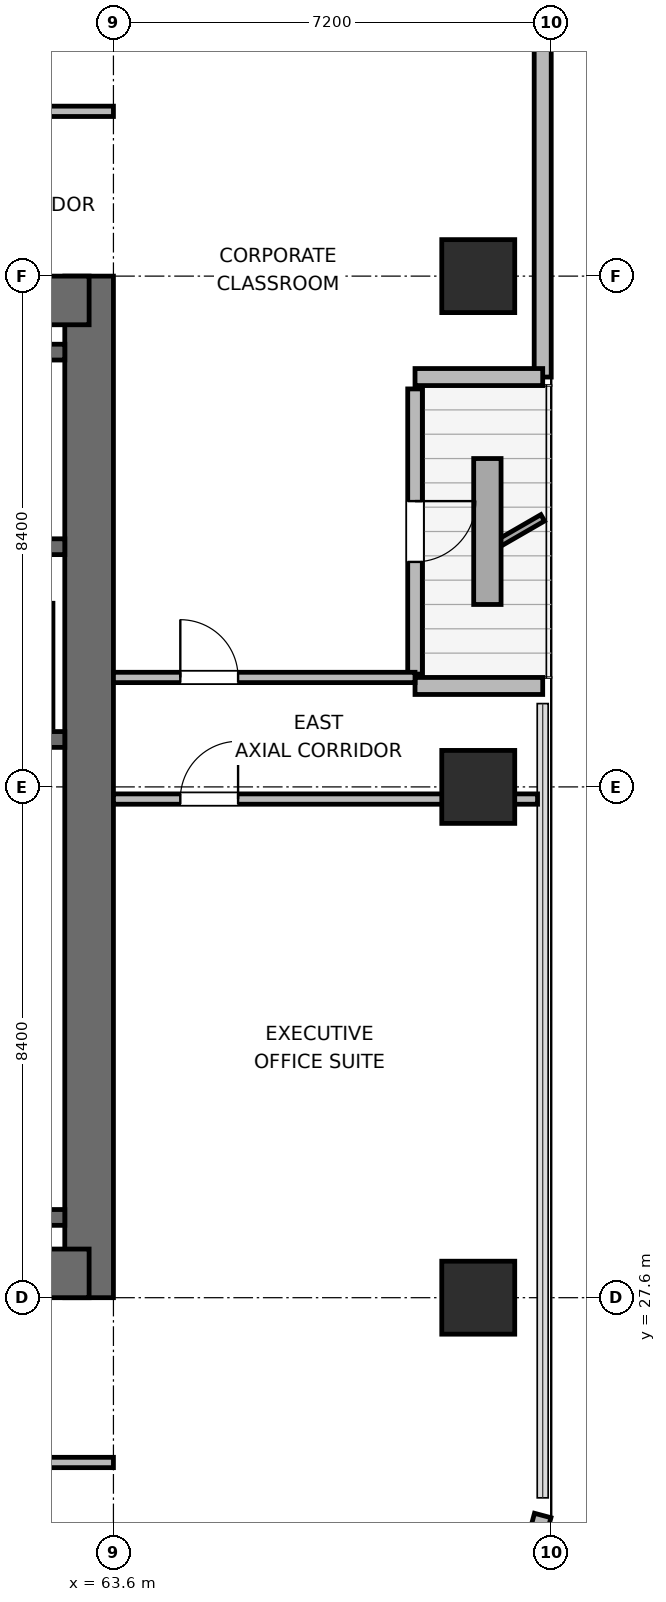
"""IFC4 building model, lengths in metres.
Left out: names, types, materials, properties, quantities, classifications, styles, units other than length and angle.
Written with IfcOpenShell. Run it as: python <this file> out.ifc"""

import sys

from ifc_helpers import new_model, si_unit, direction, frame, frame_2d, origin, origin_2d, place, context, subcontext, project, spatial, rectangle, extrude, element, fill, save


model = new_model("IFC4")
c1 = context("Model", 3, precision=1e-05, world=origin(), true_north=direction((0.0, 1.0)))
c2 = subcontext(c1, "Body", "Model", "MODEL_VIEW")
j1 = project(units=[si_unit("LENGTHUNIT", "METRE"), si_unit("PLANEANGLEUNIT", "RADIAN")], contexts=[c1])
p1 = place(None, origin())
s1 = spatial("IfcSite", under=j1, at=p1, CompositionType="ELEMENT")
p2 = place(p1, origin())
s2 = spatial("IfcBuilding", under=s1, at=p2, CompositionType="ELEMENT")
p3 = place(p2, frame((0.0, 0.0, 170.1)))
s3 = spatial("IfcBuildingStorey", under=s2, at=p3, CompositionType="ELEMENT", Elevation=170.1)
p4 = place(p3, frame((63.2, 27.6, 0.0), z_axis=(0.0, 0.0, 1.0), x_axis=(0.0, 1.0, 0.0)))
e1 = element("IfcWall", 1, at=p4, inside=s3, PredefinedType="SHEAR", context=c2, shape_type="SweptSolid", body=[
    extrude(rectangle(XDim=16.8, YDim=0.8, at=frame_2d((8.4, 0.0))), origin(), (0.0, 0.0, 1.0), 3.9),
])
p5 = place(p3, frame((54.0, 28.0, 0.0), z_axis=(0.0, 0.0, 1.0), x_axis=(1.0, 0.0, 0.0)))
e2 = element("IfcWall", 2, at=p5, inside=s3, PredefinedType="SHEAR", context=c2, shape_type="SweptSolid", body=[
    extrude(rectangle(XDim=9.2, YDim=0.8, at=frame_2d((4.6, 0.0))), origin(), (0.0, 0.0, 1.0), 3.9),
])
p6 = place(p5, frame((3.975, 0.0, 0.0)))
e3 = element("IfcOpeningElement", 3, at=p6, cuts=e2, PredefinedType="OPENING", context=c2, shape_type="SweptSolid", body=[
    extrude(rectangle(XDim=1.05, YDim=2.04, at=frame_2d((0.525, 1.02))), frame((0.0, 0.41, 0.0), z_axis=(0.0, -1.0, 0.0), x_axis=(1.0, 0.0, 0.0)), (0.0, 0.0, 1.0), 0.82),
])
p7 = place(p3, frame((54.0, 44.0, 0.0), z_axis=(0.0, 0.0, 1.0), x_axis=(1.0, 0.0, 0.0)))
e4 = element("IfcWall", 4, at=p7, inside=s3, PredefinedType="SHEAR", context=c2, shape_type="SweptSolid", body=[
    extrude(rectangle(XDim=9.2, YDim=0.8, at=frame_2d((4.6, 0.0))), origin(), (0.0, 0.0, 1.0), 3.9),
])
for number, where, z_axis, x_axis in (
    (5, (58.89, 28.92, 0.0), (0.0, 0.0, 1.0), (1.0, 0.0, 0.0)),
    (6, (58.89, 36.78, 0.0), (0.0, 0.0, 1.0), (1.0, 0.0, 0.0)),
):
    element("IfcWall", number, at=place(p3, frame(where, z_axis=z_axis, x_axis=x_axis)), inside=s3, PredefinedType="SHEAR", context=c2, shape_type="SweptSolid", body=[
        extrude(rectangle(XDim=3.91, YDim=0.26, at=frame_2d((1.955, 0.0))), origin(), (0.0, 0.0, 1.0), 3.9),
    ])
p8 = place(p3, frame((54.4, 39.95, 0.0), z_axis=(0.0, 0.0, 1.0), x_axis=(1.0, 0.0, 0.0)))
e7 = element("IfcWall", 7, at=p8, inside=s3, PredefinedType="SHEAR", context=c2, shape_type="SweptSolid", body=[
    extrude(rectangle(XDim=8.4, YDim=0.26, at=frame_2d((4.2, 0.0))), origin(), (0.0, 0.0, 1.0), 3.9),
])
p9 = place(p8, frame((0.8, 0.0, 0.0)))
e8 = element("IfcOpeningElement", 8, at=p9, cuts=e7, PredefinedType="OPENING", context=c2, shape_type="SweptSolid", body=[
    extrude(rectangle(XDim=1.0, YDim=2.04, at=frame_2d((0.5, 1.02))), frame((0.0, 0.14, 0.0), z_axis=(0.0, -1.0, 0.0), x_axis=(1.0, 0.0, 0.0)), (0.0, 0.0, 1.0), 0.28),
])
p10 = place(p3, frame((54.4, 43.15, 0.0), z_axis=(0.0, 0.0, 1.0), x_axis=(1.0, 0.0, 0.0)))
e9 = element("IfcWall", 9, at=p10, inside=s3, PredefinedType="SHEAR", context=c2, shape_type="SweptSolid", body=[
    extrude(rectangle(XDim=8.4, YDim=0.26, at=frame_2d((4.2, 0.0))), origin(), (0.0, 0.0, 1.0), 3.9),
])
for number, where, z_axis, x_axis in (
    (10, (69.6, 27.6, 0.0), (0.0, 0.0, 1.0), (1.0, 0.0, 0.0)),
    (11, (69.6, 36.0, 0.0), (0.0, 0.0, 1.0), (1.0, 0.0, 0.0)),
    (12, (69.6, 44.4, 0.0), (0.0, 0.0, 1.0), (1.0, 0.0, 0.0)),
):
    element("IfcColumn", number, at=place(p3, frame(where, z_axis=z_axis, x_axis=x_axis)), inside=s3, PredefinedType="COLUMN", context=c2, shape_type="SweptSolid", body=[
        extrude(rectangle(XDim=1.2, YDim=1.2, at=origin_2d()), origin(), (0.0, 0.0, 1.0), 3.9),
    ])
p11 = place(p3, frame((70.66, 56.982, 0.0), z_axis=(0.0, 0.0, 1.0), x_axis=(0.0, -1.0, 0.0)))
e13 = element("IfcWall", 13, at=p11, inside=s3, PredefinedType="SOLIDWALL", context=c2, shape_type="SweptSolid", body=[
    extrude(rectangle(XDim=14.242, YDim=0.28, at=frame_2d((7.121, 0.0))), origin(), (0.0, 0.0, 1.0), 3.68),
])
p12 = place(p3, frame((70.66, 42.74, 0.0), z_axis=(0.0, 0.0, 1.0), x_axis=(-1.0, 0.0, 0.0)))
e14 = element("IfcWall", 14, at=p12, inside=s3, PredefinedType="SOLIDWALL", context=c2, shape_type="SweptSolid", body=[
    extrude(rectangle(XDim=2.1, YDim=0.28, at=frame_2d((1.05, 0.0))), origin(), (0.0, 0.0, 1.0), 3.116),
])
p13 = place(p3, frame((68.56, 42.545, 0.0), z_axis=(0.0, 0.0, 1.0), x_axis=(0.0, -1.0, 0.0)))
e15 = element("IfcWall", 15, at=p13, inside=s3, PredefinedType="SOLIDWALL", context=c2, shape_type="SweptSolid", body=[
    extrude(rectangle(XDim=4.69, YDim=0.24, at=frame_2d((2.345, 0.0))), origin(), (0.0, 0.0, 1.0), 3.248),
])
p14 = place(p13, frame((1.845, 0.0, 0.0)))
e16 = element("IfcOpeningElement", 16, at=p14, cuts=e15, PredefinedType="OPENING", context=c2, shape_type="SweptSolid", body=[
    extrude(rectangle(XDim=1.0, YDim=2.02, at=frame_2d((0.5, 1.01))), frame((0.0, 0.13, 0.0), z_axis=(0.0, -1.0, 0.0), x_axis=(1.0, 0.0, 0.0)), (0.0, 0.0, 1.0), 0.26),
])
p15 = place(p3, frame((68.56, 37.66, 0.0), z_axis=(0.0, 0.0, 1.0), x_axis=(1.0, 0.0, 0.0)))
e17 = element("IfcWall", 17, at=p15, inside=s3, PredefinedType="SOLIDWALL", context=c2, shape_type="SweptSolid", body=[
    extrude(rectangle(XDim=2.1, YDim=0.28, at=frame_2d((1.05, 0.0))), origin(), (0.0, 0.0, 1.0), 3.116),
])
p16 = place(p3, frame((70.66, 24.018, 0.0), z_axis=(0.0, 0.0, 1.0), x_axis=(-0.258672222976, -0.9659651552, 0.0)))
e18 = element("IfcWall", 18, at=p16, inside=s3, PredefinedType="SOLIDWALL", context=c2, shape_type="SweptSolid", body=[
    extrude(rectangle(XDim=2.739, YDim=0.28, at=frame_2d((1.37, 0.0))), origin(), (0.0, 0.0, 1.0), 3.68),
])
p17 = place(p3, frame((62.5, 36.98, 0.0), z_axis=(0.0, 0.0, 1.0), x_axis=(0.0, 1.0, 0.0)))
e19 = element("IfcWall", 19, at=p17, inside=s3, PredefinedType="PARTITIONING", context=c2, shape_type="SweptSolid", body=[
    extrude(rectangle(XDim=2.04, YDim=0.21, at=frame_2d((1.02, 0.0))), origin(), (0.0, 0.0, 1.0), 3.68),
])
p18 = place(p3, frame((29.8, 24.89, 0.0), z_axis=(0.0, 0.0, 1.0), x_axis=(1.0, 0.0, 0.0)))
e20 = element("IfcWall", 20, at=p18, inside=s3, PredefinedType="PARTITIONING", context=c2, shape_type="SweptSolid", body=[
    extrude(rectangle(XDim=33.8, YDim=0.17, at=frame_2d((16.9, 0.0))), origin(), (0.0, 0.0, 1.0), 3.68),
])
p19 = place(p18, frame((2.37, 0.0, 0.0)))
e21 = element("IfcOpeningElement", 21, at=p19, cuts=e20, PredefinedType="OPENING", context=c2, shape_type="SweptSolid", body=[
    extrude(rectangle(XDim=0.95, YDim=2.04, at=frame_2d((0.475, 1.02))), frame((0.0, 0.095, 0.0), z_axis=(0.0, -1.0, 0.0), x_axis=(1.0, 0.0, 0.0)), (0.0, 0.0, 1.0), 0.19),
])
p20 = place(p18, frame((7.455, 0.0, 0.0)))
e22 = element("IfcOpeningElement", 22, at=p20, cuts=e20, PredefinedType="OPENING", context=c2, shape_type="SweptSolid", body=[
    extrude(rectangle(XDim=0.95, YDim=2.04, at=frame_2d((0.475, 1.02))), frame((0.0, 0.095, 0.0), z_axis=(0.0, -1.0, 0.0), x_axis=(1.0, 0.0, 0.0)), (0.0, 0.0, 1.0), 0.19),
])
p21 = place(p18, frame((11.51, 0.0, 0.0)))
e23 = element("IfcOpeningElement", 23, at=p21, cuts=e20, PredefinedType="OPENING", context=c2, shape_type="SweptSolid", body=[
    extrude(rectangle(XDim=0.95, YDim=2.04, at=frame_2d((0.475, 1.02))), frame((0.0, 0.095, 0.0), z_axis=(0.0, -1.0, 0.0), x_axis=(1.0, 0.0, 0.0)), (0.0, 0.0, 1.0), 0.19),
])
p22 = place(p18, frame((15.995, 0.0, 0.0)))
e24 = element("IfcOpeningElement", 24, at=p22, cuts=e20, PredefinedType="OPENING", context=c2, shape_type="SweptSolid", body=[
    extrude(rectangle(XDim=0.95, YDim=2.04, at=frame_2d((0.475, 1.02))), frame((0.0, 0.095, 0.0), z_axis=(0.0, -1.0, 0.0), x_axis=(1.0, 0.0, 0.0)), (0.0, 0.0, 1.0), 0.19),
])
p23 = place(p18, frame((20.91, 0.0, 0.0)))
e25 = element("IfcOpeningElement", 25, at=p23, cuts=e20, PredefinedType="OPENING", context=c2, shape_type="SweptSolid", body=[
    extrude(rectangle(XDim=0.95, YDim=2.04, at=frame_2d((0.475, 1.02))), frame((0.0, 0.095, 0.0), z_axis=(0.0, -1.0, 0.0), x_axis=(1.0, 0.0, 0.0)), (0.0, 0.0, 1.0), 0.19),
])
p24 = place(p18, frame((25.395, 0.0, 0.0)))
e26 = element("IfcOpeningElement", 26, at=p24, cuts=e20, PredefinedType="OPENING", context=c2, shape_type="SweptSolid", body=[
    extrude(rectangle(XDim=0.95, YDim=2.04, at=frame_2d((0.475, 1.02))), frame((0.0, 0.095, 0.0), z_axis=(0.0, -1.0, 0.0), x_axis=(1.0, 0.0, 0.0)), (0.0, 0.0, 1.0), 0.19),
])
p25 = place(p18, frame((30.48, 0.0, 0.0)))
e27 = element("IfcOpeningElement", 27, at=p25, cuts=e20, PredefinedType="OPENING", context=c2, shape_type="SweptSolid", body=[
    extrude(rectangle(XDim=0.95, YDim=2.04, at=frame_2d((0.475, 1.02))), frame((0.0, 0.095, 0.0), z_axis=(0.0, -1.0, 0.0), x_axis=(1.0, 0.0, 0.0)), (0.0, 0.0, 1.0), 0.19),
])
p26 = place(p3, frame((29.8, 47.11, 0.0), z_axis=(0.0, 0.0, 1.0), x_axis=(1.0, 0.0, 0.0)))
e28 = element("IfcWall", 28, at=p26, inside=s3, PredefinedType="PARTITIONING", context=c2, shape_type="SweptSolid", body=[
    extrude(rectangle(XDim=33.8, YDim=0.17, at=frame_2d((16.9, 0.0))), origin(), (0.0, 0.0, 1.0), 3.68),
])
p27 = place(p26, frame((0.625, 0.0, 0.0)))
e29 = element("IfcOpeningElement", 29, at=p27, cuts=e28, PredefinedType="OPENING", context=c2, shape_type="SweptSolid", body=[
    extrude(rectangle(XDim=0.95, YDim=2.04, at=frame_2d((0.475, 1.02))), frame((0.0, 0.095, 0.0), z_axis=(0.0, -1.0, 0.0), x_axis=(1.0, 0.0, 0.0)), (0.0, 0.0, 1.0), 0.19),
])
p28 = place(p26, frame((6.185, 0.0, 0.0)))
e30 = element("IfcOpeningElement", 30, at=p28, cuts=e28, PredefinedType="OPENING", context=c2, shape_type="SweptSolid", body=[
    extrude(rectangle(XDim=0.95, YDim=2.04, at=frame_2d((0.475, 1.02))), frame((0.0, 0.095, 0.0), z_axis=(0.0, -1.0, 0.0), x_axis=(1.0, 0.0, 0.0)), (0.0, 0.0, 1.0), 0.19),
])
p29 = place(p26, frame((12.465, 0.0, 0.0)))
e31 = element("IfcOpeningElement", 31, at=p29, cuts=e28, PredefinedType="OPENING", context=c2, shape_type="SweptSolid", body=[
    extrude(rectangle(XDim=0.95, YDim=2.04, at=frame_2d((0.475, 1.02))), frame((0.0, 0.095, 0.0), z_axis=(0.0, -1.0, 0.0), x_axis=(1.0, 0.0, 0.0)), (0.0, 0.0, 1.0), 0.19),
])
p30 = place(p26, frame((20.065, 0.0, 0.0)))
e32 = element("IfcOpeningElement", 32, at=p30, cuts=e28, PredefinedType="OPENING", context=c2, shape_type="SweptSolid", body=[
    extrude(rectangle(XDim=0.95, YDim=2.04, at=frame_2d((0.475, 1.02))), frame((0.0, 0.095, 0.0), z_axis=(0.0, -1.0, 0.0), x_axis=(1.0, 0.0, 0.0)), (0.0, 0.0, 1.0), 0.19),
])
p31 = place(p26, frame((29.585, 0.0, 0.0)))
e33 = element("IfcOpeningElement", 33, at=p31, cuts=e28, PredefinedType="OPENING", context=c2, shape_type="SweptSolid", body=[
    extrude(rectangle(XDim=0.95, YDim=2.04, at=frame_2d((0.475, 1.02))), frame((0.0, 0.095, 0.0), z_axis=(0.0, -1.0, 0.0), x_axis=(1.0, 0.0, 0.0)), (0.0, 0.0, 1.0), 0.19),
])
p32 = place(p3, frame((63.6, 35.8, 0.0), z_axis=(0.0, 0.0, 1.0), x_axis=(1.0, 0.0, 0.0)))
e34 = element("IfcWall", 34, at=p32, inside=s3, PredefinedType="PARTITIONING", context=c2, shape_type="SweptSolid", body=[
    extrude(rectangle(XDim=6.975, YDim=0.17, at=frame_2d((3.487, 0.0))), origin(), (0.0, 0.0, 1.0), 3.043),
])
p33 = place(p32, frame((1.1, 0.0, 0.0)))
e35 = element("IfcOpeningElement", 35, at=p33, cuts=e34, PredefinedType="OPENING", context=c2, shape_type="SweptSolid", body=[
    extrude(rectangle(XDim=0.95, YDim=2.04, at=frame_2d((0.475, 1.02))), frame((0.0, 0.095, 0.0), z_axis=(0.0, -1.0, 0.0), x_axis=(1.0, 0.0, 0.0)), (0.0, 0.0, 1.0), 0.19),
])
p34 = place(p3, frame((63.6, 37.8, 0.0), z_axis=(0.0, 0.0, 1.0), x_axis=(1.0, 0.0, 0.0)))
e36 = element("IfcWall", 36, at=p34, inside=s3, PredefinedType="PARTITIONING", context=c2, shape_type="SweptSolid", body=[
    extrude(rectangle(XDim=4.96, YDim=0.17, at=frame_2d((2.48, 0.0))), origin(), (0.0, 0.0, 1.0), 3.68),
])
p35 = place(p34, frame((1.1, 0.0, 0.0)))
e37 = element("IfcOpeningElement", 37, at=p35, cuts=e36, PredefinedType="OPENING", context=c2, shape_type="SweptSolid", body=[
    extrude(rectangle(XDim=0.95, YDim=2.04, at=frame_2d((0.475, 1.02))), frame((0.0, 0.095, 0.0), z_axis=(0.0, -1.0, 0.0), x_axis=(1.0, 0.0, 0.0)), (0.0, 0.0, 1.0), 0.19),
])
p36 = place(p14, origin())
e38 = element("IfcDoor", 38, at=p36, inside=s3, OperationType="SINGLE_SWING_LEFT", PredefinedType="DOOR", context=c2, shape_type="SweptSolid", body=[
    extrude(rectangle(XDim=1.0, YDim=2.02, at=frame_2d((0.5, 1.01))), frame((0.0, 0.025, 0.0), z_axis=(0.0, -1.0, 0.0), x_axis=(1.0, 0.0, 0.0)), (0.0, 0.0, 1.0), 0.05),
])
fill(e16, e38)
p37 = place(p33, origin())
e39 = element("IfcDoor", 39, at=p37, inside=s3, OperationType="SINGLE_SWING_RIGHT", PredefinedType="DOOR", context=c2, shape_type="SweptSolid", body=[
    extrude(rectangle(XDim=0.95, YDim=2.04, at=frame_2d((0.475, 1.02))), frame((0.0, 0.025, 0.0), z_axis=(0.0, -1.0, 0.0), x_axis=(1.0, 0.0, 0.0)), (0.0, 0.0, 1.0), 0.05),
])
fill(e35, e39)
p38 = place(p35, origin())
e40 = element("IfcDoor", 40, at=p38, inside=s3, OperationType="SINGLE_SWING_LEFT", PredefinedType="DOOR", context=c2, shape_type="SweptSolid", body=[
    extrude(rectangle(XDim=0.95, YDim=2.04, at=frame_2d((0.475, 1.02))), frame((0.0, 0.025, 0.0), z_axis=(0.0, -1.0, 0.0), x_axis=(1.0, 0.0, 0.0)), (0.0, 0.0, 1.0), 0.05),
])
fill(e37, e40)
save(model, sys.argv[1])
